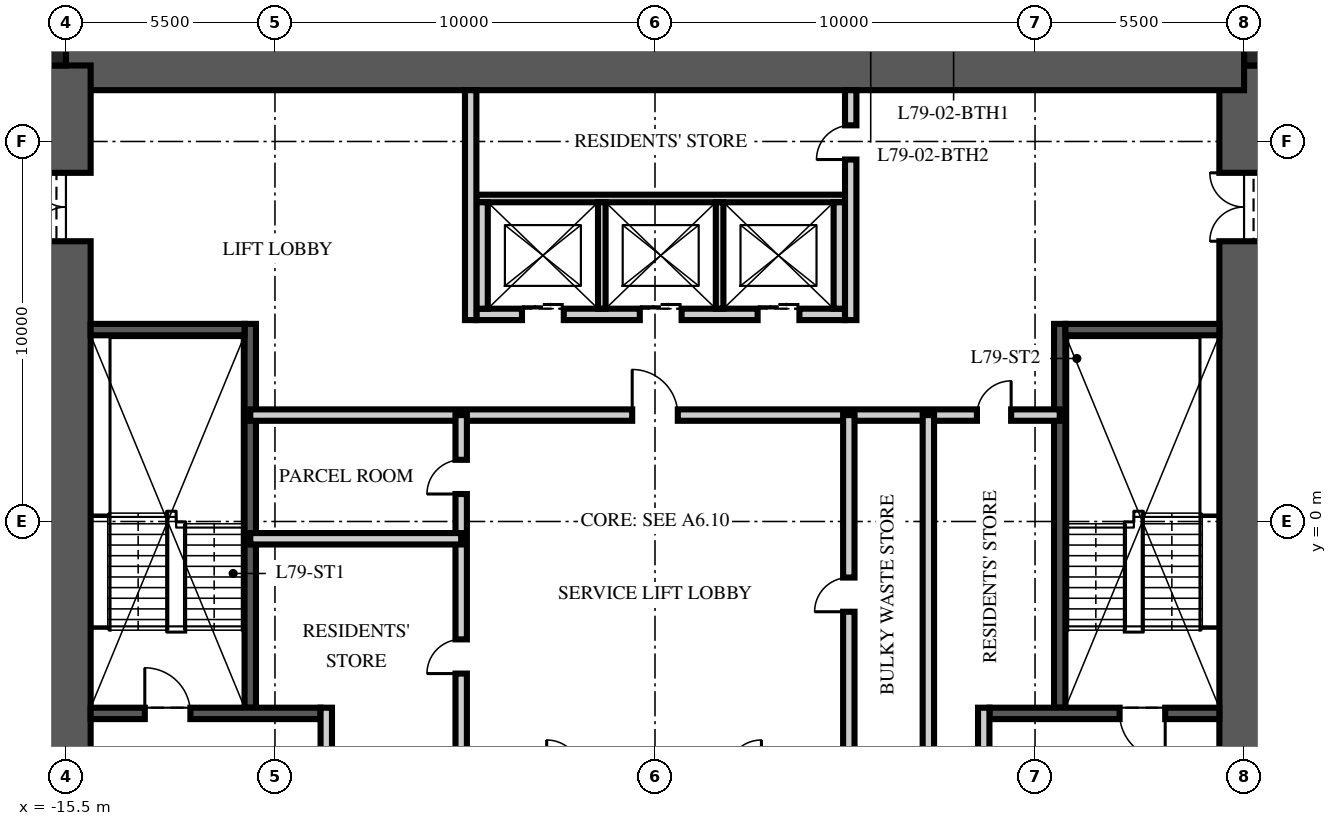
"""IFC4 building model, lengths in metres.
Left out: names, types, materials, properties, quantities, classifications, styles, units other than length and angle.
Written with IfcOpenShell. Run it as: python <this file> out.ifc"""

import sys

from ifc_helpers import new_model, si_unit, direction, frame, frame_2d, origin, origin_2d, place, context, subcontext, project, spatial, rectangle, extrude, element, fill, save


model = new_model("IFC4")
c1 = context("Model", 3, precision=1e-05, world=origin(), true_north=direction((0.0, 1.0)))
c2 = subcontext(c1, "Body", "Model", "MODEL_VIEW")
j1 = project(units=[si_unit("LENGTHUNIT", "METRE"), si_unit("PLANEANGLEUNIT", "RADIAN")], contexts=[c1])
p1 = place(None, origin())
s1 = spatial("IfcSite", under=j1, at=p1, CompositionType="ELEMENT")
p2 = place(p1, origin())
s2 = spatial("IfcBuilding", under=s1, at=p2, CompositionType="ELEMENT")
p3 = place(p2, frame((0.0, 0.0, 315.75)))
s3 = spatial("IfcBuildingStorey", under=s2, at=p3, CompositionType="ELEMENT", Elevation=315.75)
p4 = place(p3, frame((15.5, -12.0, -0.25), z_axis=(0.0, 0.0, 1.0), x_axis=(0.0, 1.0, 0.0)))
e1 = element("IfcWall", 1, at=p4, inside=s3, PredefinedType="SHEAR", context=c2, shape_type="SweptSolid", body=[
    extrude(rectangle(XDim=24.0, YDim=1.3, at=frame_2d((12.0, 0.0))), origin(), (0.0, 0.0, 1.0), 3.75),
])
p5 = place(p4, frame((3.125, 0.0, 0.25)))
e2 = element("IfcOpeningElement", 2, at=p5, cuts=e1, PredefinedType="OPENING", context=c2, shape_type="SweptSolid", body=[
    extrude(rectangle(XDim=1.2, YDim=2.1, at=frame_2d((0.6, 1.05))), frame((0.0, 0.66, 0.0), z_axis=(0.0, -1.0, 0.0), x_axis=(1.0, 0.0, 0.0)), (0.0, 0.0, 1.0), 1.32),
])
p6 = place(p4, frame((19.375, 0.0, 0.25)))
e3 = element("IfcOpeningElement", 3, at=p6, cuts=e1, PredefinedType="OPENING", context=c2, shape_type="SweptSolid", body=[
    extrude(rectangle(XDim=1.8, YDim=2.1, at=frame_2d((0.9, 1.05))), frame((0.0, 0.66, 0.0), z_axis=(0.0, -1.0, 0.0), x_axis=(1.0, 0.0, 0.0)), (0.0, 0.0, 1.0), 1.32),
])
p7 = place(p3, frame((-15.5, 12.0, -0.25), z_axis=(0.0, 0.0, 1.0), x_axis=(1.0, 0.0, 0.0)))
e4 = element("IfcWall", 4, at=p7, inside=s3, PredefinedType="SHEAR", context=c2, shape_type="SweptSolid", body=[
    extrude(rectangle(XDim=31.0, YDim=1.3, at=frame_2d((15.5, 0.0))), origin(), (0.0, 0.0, 1.0), 3.75),
])
p8 = place(p3, frame((-15.5, -12.0, -0.25), z_axis=(0.0, 0.0, 1.0), x_axis=(0.0, 1.0, 0.0)))
e5 = element("IfcWall", 5, at=p8, inside=s3, PredefinedType="SHEAR", context=c2, shape_type="SweptSolid", body=[
    extrude(rectangle(XDim=24.0, YDim=1.3, at=frame_2d((12.0, 0.0))), origin(), (0.0, 0.0, 1.0), 3.75),
])
p9 = place(p8, frame((3.125, 0.0, 0.25)))
e6 = element("IfcOpeningElement", 6, at=p9, cuts=e5, PredefinedType="OPENING", context=c2, shape_type="SweptSolid", body=[
    extrude(rectangle(XDim=1.2, YDim=2.1, at=frame_2d((0.6, 1.05))), frame((0.0, 0.66, 0.0), z_axis=(0.0, -1.0, 0.0), x_axis=(1.0, 0.0, 0.0)), (0.0, 0.0, 1.0), 1.32),
])
p10 = place(p8, frame((19.375, 0.0, 0.25)))
e7 = element("IfcOpeningElement", 7, at=p10, cuts=e5, PredefinedType="OPENING", context=c2, shape_type="SweptSolid", body=[
    extrude(rectangle(XDim=1.8, YDim=2.1, at=frame_2d((0.9, 1.05))), frame((0.0, 0.66, 0.0), z_axis=(0.0, -1.0, 0.0), x_axis=(1.0, 0.0, 0.0)), (0.0, 0.0, 1.0), 1.32),
])
for number, where, z_axis, x_axis in (
    (8, (15.825, 12.325, -0.25), (0.0, 0.0, 1.0), (1.0, 0.0, 0.0)),
    (9, (-15.825, 12.325, -0.25), (0.0, 0.0, 1.0), (1.0, 0.0, 0.0)),
):
    element("IfcColumn", number, at=place(p3, frame(where, z_axis=z_axis, x_axis=x_axis)), inside=s3, PredefinedType="COLUMN", context=c2, shape_type="SweptSolid", body=[
        extrude(rectangle(XDim=0.65, YDim=0.65, at=origin_2d()), origin(), (0.0, 0.0, 1.0), 3.75),
    ])
p11 = place(p3, frame((-10.65, -4.9, 0.0), z_axis=(0.0, 0.0, 1.0), x_axis=(0.0, 1.0, 0.0)))
e10 = element("IfcWall", 10, at=p11, inside=s3, PredefinedType="SOLIDWALL", context=c2, shape_type="SweptSolid", body=[
    extrude(rectangle(XDim=10.1, YDim=0.3, at=frame_2d((5.05, 0.0))), origin(), (0.0, 0.0, 1.0), 3.5),
])
p12 = place(p3, frame((-14.85, -5.05, 0.0), z_axis=(0.0, 0.0, 1.0), x_axis=(1.0, 0.0, 0.0)))
e11 = element("IfcWall", 11, at=p12, inside=s3, PredefinedType="SOLIDWALL", context=c2, shape_type="SweptSolid", body=[
    extrude(rectangle(XDim=6.05, YDim=0.3, at=frame_2d((3.025, 0.0))), origin(), (0.0, 0.0, 1.0), 3.5),
])
p13 = place(p12, frame((1.425, 0.0, 0.0)))
e12 = element("IfcOpeningElement", 12, at=p13, cuts=e11, PredefinedType="OPENING", context=c2, shape_type="SweptSolid", body=[
    extrude(rectangle(XDim=1.2, YDim=2.1, at=frame_2d((0.6, 1.05))), frame((0.0, 0.16, 0.0), z_axis=(0.0, -1.0, 0.0), x_axis=(1.0, 0.0, 0.0)), (0.0, 0.0, 1.0), 0.32),
])
p14 = place(p3, frame((-14.85, 5.05, 0.0), z_axis=(0.0, 0.0, 1.0), x_axis=(1.0, 0.0, 0.0)))
e13 = element("IfcWall", 13, at=p14, inside=s3, PredefinedType="SOLIDWALL", context=c2, shape_type="SweptSolid", body=[
    extrude(rectangle(XDim=4.05, YDim=0.3, at=frame_2d((2.025, 0.0))), origin(), (0.0, 0.0, 1.0), 3.5),
])
p15 = place(p3, frame((-8.65, -11.35, 0.0), z_axis=(0.0, 0.0, 1.0), x_axis=(0.0, 1.0, 0.0)))
e14 = element("IfcWall", 14, at=p15, inside=s3, PredefinedType="PARTITIONING", context=c2, shape_type="SweptSolid", body=[
    extrude(rectangle(XDim=6.45, YDim=0.3, at=frame_2d((3.225, 0.0))), origin(), (0.0, 0.0, 1.0), 3.5),
])
p16 = place(p15, frame((2.6, 0.0, 0.0)))
e15 = element("IfcOpeningElement", 15, at=p16, cuts=e14, PredefinedType="OPENING", context=c2, shape_type="SweptSolid", body=[
    extrude(rectangle(XDim=1.1, YDim=2.1, at=frame_2d((0.55, 1.05))), frame((0.0, 0.16, 0.0), z_axis=(0.0, -1.0, 0.0), x_axis=(1.0, 0.0, 0.0)), (0.0, 0.0, 1.0), 0.32),
])
p17 = place(p3, frame((10.65, -4.9, 0.0), z_axis=(0.0, 0.0, 1.0), x_axis=(0.0, 1.0, 0.0)))
e16 = element("IfcWall", 16, at=p17, inside=s3, PredefinedType="SOLIDWALL", context=c2, shape_type="SweptSolid", body=[
    extrude(rectangle(XDim=10.1, YDim=0.3, at=frame_2d((5.05, 0.0))), origin(), (0.0, 0.0, 1.0), 3.5),
])
p18 = place(p3, frame((14.85, -5.05, 0.0), z_axis=(0.0, 0.0, 1.0), x_axis=(-1.0, 0.0, 0.0)))
e17 = element("IfcWall", 17, at=p18, inside=s3, PredefinedType="SOLIDWALL", context=c2, shape_type="SweptSolid", body=[
    extrude(rectangle(XDim=6.05, YDim=0.3, at=frame_2d((3.025, 0.0))), origin(), (0.0, 0.0, 1.0), 3.5),
])
p19 = place(p18, frame((1.425, 0.0, 0.0)))
e18 = element("IfcOpeningElement", 18, at=p19, cuts=e17, PredefinedType="OPENING", context=c2, shape_type="SweptSolid", body=[
    extrude(rectangle(XDim=1.2, YDim=2.1, at=frame_2d((0.6, 1.05))), frame((0.0, 0.16, 0.0), z_axis=(0.0, -1.0, 0.0), x_axis=(1.0, 0.0, 0.0)), (0.0, 0.0, 1.0), 0.32),
])
p20 = place(p3, frame((14.85, 5.05, 0.0), z_axis=(0.0, 0.0, 1.0), x_axis=(-1.0, 0.0, 0.0)))
e19 = element("IfcWall", 19, at=p20, inside=s3, PredefinedType="SOLIDWALL", context=c2, shape_type="SweptSolid", body=[
    extrude(rectangle(XDim=4.05, YDim=0.3, at=frame_2d((2.025, 0.0))), origin(), (0.0, 0.0, 1.0), 3.5),
])
p21 = place(p3, frame((8.65, -11.35, 0.0), z_axis=(0.0, 0.0, 1.0), x_axis=(0.0, 1.0, 0.0)))
e20 = element("IfcWall", 20, at=p21, inside=s3, PredefinedType="PARTITIONING", context=c2, shape_type="SweptSolid", body=[
    extrude(rectangle(XDim=6.45, YDim=0.3, at=frame_2d((3.225, 0.0))), origin(), (0.0, 0.0, 1.0), 3.5),
])
p22 = place(p21, frame((2.6, 0.0, 0.0)))
e21 = element("IfcOpeningElement", 21, at=p22, cuts=e20, PredefinedType="OPENING", context=c2, shape_type="SweptSolid", body=[
    extrude(rectangle(XDim=1.1, YDim=2.1, at=frame_2d((0.55, 1.05))), frame((0.0, 0.16, 0.0), z_axis=(0.0, -1.0, 0.0), x_axis=(1.0, 0.0, 0.0)), (0.0, 0.0, 1.0), 0.32),
])
p23 = place(p3, frame((-4.7, 5.45, 0.0), z_axis=(0.0, 0.0, 1.0), x_axis=(1.0, 0.0, 0.0)))
e22 = element("IfcWall", 22, at=p23, inside=s3, PredefinedType="PARTITIONING", context=c2, shape_type="SweptSolid", body=[
    extrude(rectangle(XDim=9.7, YDim=0.3, at=frame_2d((4.85, 0.0))), origin(), (0.0, 0.0, 1.0), 3.5),
])
p24 = place(p23, frame((1.2, 0.0, 0.0)))
e23 = element("IfcOpeningElement", 23, at=p24, cuts=e22, PredefinedType="OPENING", context=c2, shape_type="SweptSolid", body=[
    extrude(rectangle(XDim=1.1, YDim=2.1, at=frame_2d((0.55, 1.05))), frame((0.0, 0.16, 0.0), z_axis=(0.0, -1.0, 0.0), x_axis=(1.0, 0.0, 0.0)), (0.0, 0.0, 1.0), 0.32),
])
p25 = place(p23, frame((4.3, 0.0, 0.0)))
e24 = element("IfcOpeningElement", 24, at=p25, cuts=e22, PredefinedType="OPENING", context=c2, shape_type="SweptSolid", body=[
    extrude(rectangle(XDim=1.1, YDim=2.1, at=frame_2d((0.55, 1.05))), frame((0.0, 0.16, 0.0), z_axis=(0.0, -1.0, 0.0), x_axis=(1.0, 0.0, 0.0)), (0.0, 0.0, 1.0), 0.32),
])
p26 = place(p23, frame((7.4, 0.0, 0.0)))
e25 = element("IfcOpeningElement", 25, at=p26, cuts=e22, PredefinedType="OPENING", context=c2, shape_type="SweptSolid", body=[
    extrude(rectangle(XDim=1.1, YDim=2.1, at=frame_2d((0.55, 1.05))), frame((0.0, 0.16, 0.0), z_axis=(0.0, -1.0, 0.0), x_axis=(1.0, 0.0, 0.0)), (0.0, 0.0, 1.0), 0.32),
])
p27 = place(p3, frame((-4.7, 8.5, 0.0), z_axis=(0.0, 0.0, 1.0), x_axis=(1.0, 0.0, 0.0)))
e26 = element("IfcWall", 26, at=p27, inside=s3, PredefinedType="PARTITIONING", context=c2, shape_type="SweptSolid", body=[
    extrude(rectangle(XDim=9.7, YDim=0.2, at=frame_2d((4.85, 0.0))), origin(), (0.0, 0.0, 1.0), 3.5),
])
for number, where, z_axis, x_axis in (
    (27, (-4.55, 5.6, 0.0), (0.0, 0.0, 1.0), (0.0, 1.0, 0.0)),
    (28, (4.85, 5.6, 0.0), (0.0, 0.0, 1.0), (0.0, 1.0, 0.0)),
):
    element("IfcWall", number, at=place(p3, frame(where, z_axis=z_axis, x_axis=x_axis)), inside=s3, PredefinedType="PARTITIONING", context=c2, shape_type="SweptSolid", body=[
        extrude(rectangle(XDim=2.8, YDim=0.3, at=frame_2d((1.4, 0.0))), origin(), (0.0, 0.0, 1.0), 3.5),
    ])
for number, where, z_axis, x_axis in (
    (29, (-1.4, 5.6, 0.0), (0.0, 0.0, 1.0), (0.0, 1.0, 0.0)),
    (30, (1.7, 5.6, 0.0), (0.0, 0.0, 1.0), (0.0, 1.0, 0.0)),
):
    element("IfcWall", number, at=place(p3, frame(where, z_axis=z_axis, x_axis=x_axis)), inside=s3, PredefinedType="PARTITIONING", context=c2, shape_type="SweptSolid", body=[
        extrude(rectangle(XDim=2.8, YDim=0.2, at=frame_2d((1.4, 0.0))), origin(), (0.0, 0.0, 1.0), 3.5),
    ])
p28 = place(p3, frame((-10.65, 2.8, 0.0), z_axis=(0.0, 0.0, 1.0), x_axis=(1.0, 0.0, 0.0)))
e31 = element("IfcWall", 31, at=p28, inside=s3, PredefinedType="PARTITIONING", context=c2, shape_type="SweptSolid", body=[
    extrude(rectangle(XDim=21.3, YDim=0.3, at=frame_2d((10.65, 0.0))), origin(), (0.0, 0.0, 1.0), 3.5),
])
p29 = place(p28, frame((10.05, 0.0, 0.0)))
e32 = element("IfcOpeningElement", 32, at=p29, cuts=e31, PredefinedType="OPENING", context=c2, shape_type="SweptSolid", body=[
    extrude(rectangle(XDim=1.2, YDim=2.1, at=frame_2d((0.6, 1.05))), frame((0.0, 0.16, 0.0), z_axis=(0.0, -1.0, 0.0), x_axis=(1.0, 0.0, 0.0)), (0.0, 0.0, 1.0), 0.32),
])
p30 = place(p28, frame((19.121, 0.0, 0.0)))
e33 = element("IfcOpeningElement", 33, at=p30, cuts=e31, PredefinedType="OPENING", context=c2, shape_type="SweptSolid", body=[
    extrude(rectangle(XDim=0.9, YDim=2.1, at=frame_2d((0.45, 1.05))), frame((0.0, 0.16, 0.0), z_axis=(0.0, -1.0, 0.0), x_axis=(1.0, 0.0, 0.0)), (0.0, 0.0, 1.0), 0.32),
])
p31 = place(p3, frame((-5.1, -6.65, 0.0), z_axis=(0.0, 0.0, 1.0), x_axis=(0.0, 1.0, 0.0)))
e34 = element("IfcWall", 34, at=p31, inside=s3, PredefinedType="PARTITIONING", context=c2, shape_type="SweptSolid", body=[
    extrude(rectangle(XDim=9.45, YDim=0.3, at=frame_2d((4.725, 0.0))), origin(), (0.0, 0.0, 1.0), 3.5),
])
p32 = place(p31, frame((2.648, 0.0, 0.0)))
e35 = element("IfcOpeningElement", 35, at=p32, cuts=e34, PredefinedType="OPENING", context=c2, shape_type="SweptSolid", body=[
    extrude(rectangle(XDim=0.9, YDim=2.1, at=frame_2d((0.45, 1.05))), frame((0.0, 0.16, 0.0), z_axis=(0.0, -1.0, 0.0), x_axis=(1.0, 0.0, 0.0)), (0.0, 0.0, 1.0), 0.32),
])
p33 = place(p31, frame((7.373, 0.0, 0.0)))
e36 = element("IfcOpeningElement", 36, at=p33, cuts=e34, PredefinedType="OPENING", context=c2, shape_type="SweptSolid", body=[
    extrude(rectangle(XDim=0.9, YDim=2.1, at=frame_2d((0.45, 1.05))), frame((0.0, 0.16, 0.0), z_axis=(0.0, -1.0, 0.0), x_axis=(1.0, 0.0, 0.0)), (0.0, 0.0, 1.0), 0.32),
])
p34 = place(p3, frame((5.1, -6.65, 0.0), z_axis=(0.0, 0.0, 1.0), x_axis=(0.0, 1.0, 0.0)))
e37 = element("IfcWall", 37, at=p34, inside=s3, PredefinedType="PARTITIONING", context=c2, shape_type="SweptSolid", body=[
    extrude(rectangle(XDim=9.45, YDim=0.3, at=frame_2d((4.725, 0.0))), origin(), (0.0, 0.0, 1.0), 3.5),
])
p35 = place(p34, frame((4.275, 0.0, 0.0)))
e38 = element("IfcOpeningElement", 38, at=p35, cuts=e37, PredefinedType="OPENING", context=c2, shape_type="SweptSolid", body=[
    extrude(rectangle(XDim=0.9, YDim=2.1, at=frame_2d((0.45, 1.05))), frame((0.0, 0.16, 0.0), z_axis=(0.0, -1.0, 0.0), x_axis=(1.0, 0.0, 0.0)), (0.0, 0.0, 1.0), 0.32),
])
p36 = place(p3, frame((-10.65, -0.455, 0.0), z_axis=(0.0, 0.0, 1.0), x_axis=(1.0, 0.0, 0.0)))
e39 = element("IfcWall", 39, at=p36, inside=s3, PredefinedType="PARTITIONING", context=c2, shape_type="SweptSolid", body=[
    extrude(rectangle(XDim=5.55, YDim=0.3, at=frame_2d((2.775, 0.0))), origin(), (0.0, 0.0, 1.0), 3.5),
])
p37 = place(p3, frame((7.193, -6.65, 0.0), z_axis=(0.0, 0.0, 1.0), x_axis=(0.0, 1.0, 0.0)))
e40 = element("IfcWall", 40, at=p37, inside=s3, PredefinedType="PARTITIONING", context=c2, shape_type="SweptSolid", body=[
    extrude(rectangle(XDim=9.45, YDim=0.3, at=frame_2d((4.725, 0.0))), origin(), (0.0, 0.0, 1.0), 3.5),
])
p38 = place(p3, frame((-4.85, 5.3, 0.0), z_axis=(0.0, 0.0, 1.0), x_axis=(0.0, 1.0, 0.0)))
e41 = element("IfcWall", 41, at=p38, inside=s3, PredefinedType="PARTITIONING", context=c2, shape_type="SweptSolid", body=[
    extrude(rectangle(XDim=6.05, YDim=0.3, at=frame_2d((3.025, 0.0))), origin(), (0.0, 0.0, 1.0), 3.5),
])
p39 = place(p3, frame((5.15, 5.3, 0.0), z_axis=(0.0, 0.0, 1.0), x_axis=(0.0, 1.0, 0.0)))
e42 = element("IfcWall", 42, at=p39, inside=s3, PredefinedType="PARTITIONING", context=c2, shape_type="SweptSolid", body=[
    extrude(rectangle(XDim=6.05, YDim=0.3, at=frame_2d((3.025, 0.0))), origin(), (0.0, 0.0, 1.0), 3.5),
])
p40 = place(p39, frame((4.225, 0.0, 0.0)))
e43 = element("IfcOpeningElement", 43, at=p40, cuts=e42, PredefinedType="OPENING", context=c2, shape_type="SweptSolid", body=[
    extrude(rectangle(XDim=0.9, YDim=2.1, at=frame_2d((0.45, 1.05))), frame((0.0, 0.16, 0.0), z_axis=(0.0, -1.0, 0.0), x_axis=(1.0, 0.0, 0.0)), (0.0, 0.0, 1.0), 0.32),
])
p41 = place(p13, origin())
e44 = element("IfcDoor", 44, at=p41, inside=s3, OperationType="SINGLE_SWING_LEFT", PredefinedType="DOOR", context=c2, shape_type="SweptSolid", body=[
    extrude(rectangle(XDim=1.2, YDim=2.1, at=frame_2d((0.6, 1.05))), frame((0.0, 0.025, 0.0), z_axis=(0.0, -1.0, 0.0), x_axis=(1.0, 0.0, 0.0)), (0.0, 0.0, 1.0), 0.05),
])
fill(e12, e44)
p42 = place(p10, origin())
e45 = element("IfcDoor", 45, at=p42, inside=s3, OperationType="DOUBLE_DOOR_SINGLE_SWING", PredefinedType="DOOR", context=c2, shape_type="SweptSolid", body=[
    extrude(rectangle(XDim=1.8, YDim=2.1, at=frame_2d((0.9, 1.05))), frame((0.0, 0.025, 0.0), z_axis=(0.0, -1.0, 0.0), x_axis=(1.0, 0.0, 0.0)), (0.0, 0.0, 1.0), 0.05),
])
fill(e7, e45)
p43 = place(p19, origin())
e46 = element("IfcDoor", 46, at=p43, inside=s3, OperationType="SINGLE_SWING_LEFT", PredefinedType="DOOR", context=c2, shape_type="SweptSolid", body=[
    extrude(rectangle(XDim=1.2, YDim=2.1, at=frame_2d((0.6, 1.05))), frame((0.0, 0.025, 0.0), z_axis=(0.0, -1.0, 0.0), x_axis=(1.0, 0.0, 0.0)), (0.0, 0.0, 1.0), 0.05),
])
fill(e18, e46)
p44 = place(p6, origin())
e47 = element("IfcDoor", 47, at=p44, inside=s3, OperationType="DOUBLE_DOOR_SINGLE_SWING", PredefinedType="DOOR", context=c2, shape_type="SweptSolid", body=[
    extrude(rectangle(XDim=1.8, YDim=2.1, at=frame_2d((0.9, 1.05))), frame((0.0, 0.025, 0.0), z_axis=(0.0, -1.0, 0.0), x_axis=(1.0, 0.0, 0.0)), (0.0, 0.0, 1.0), 0.05),
])
fill(e3, e47)
p45 = place(p24, origin())
e48 = element("IfcDoor", 48, at=p45, inside=s3, OperationType="DOUBLE_DOOR_SLIDING", PredefinedType="DOOR", context=c2, shape_type="SweptSolid", body=[
    extrude(rectangle(XDim=1.1, YDim=2.1, at=frame_2d((0.55, 1.05))), frame((0.0, 0.025, 0.0), z_axis=(0.0, -1.0, 0.0), x_axis=(1.0, 0.0, 0.0)), (0.0, 0.0, 1.0), 0.05),
])
fill(e23, e48)
p46 = place(p25, origin())
e49 = element("IfcDoor", 49, at=p46, inside=s3, OperationType="DOUBLE_DOOR_SLIDING", PredefinedType="DOOR", context=c2, shape_type="SweptSolid", body=[
    extrude(rectangle(XDim=1.1, YDim=2.1, at=frame_2d((0.55, 1.05))), frame((0.0, 0.025, 0.0), z_axis=(0.0, -1.0, 0.0), x_axis=(1.0, 0.0, 0.0)), (0.0, 0.0, 1.0), 0.05),
])
fill(e24, e49)
p47 = place(p26, origin())
e50 = element("IfcDoor", 50, at=p47, inside=s3, OperationType="DOUBLE_DOOR_SLIDING", PredefinedType="DOOR", context=c2, shape_type="SweptSolid", body=[
    extrude(rectangle(XDim=1.1, YDim=2.1, at=frame_2d((0.55, 1.05))), frame((0.0, 0.025, 0.0), z_axis=(0.0, -1.0, 0.0), x_axis=(1.0, 0.0, 0.0)), (0.0, 0.0, 1.0), 0.05),
])
fill(e25, e50)
p48 = place(p29, origin())
e51 = element("IfcDoor", 51, at=p48, inside=s3, OperationType="SINGLE_SWING_LEFT", PredefinedType="DOOR", context=c2, shape_type="SweptSolid", body=[
    extrude(rectangle(XDim=1.2, YDim=2.1, at=frame_2d((0.6, 1.05))), frame((0.0, 0.025, 0.0), z_axis=(0.0, -1.0, 0.0), x_axis=(1.0, 0.0, 0.0)), (0.0, 0.0, 1.0), 0.05),
])
fill(e32, e51)
p49 = place(p32, origin())
e52 = element("IfcDoor", 52, at=p49, inside=s3, OperationType="SINGLE_SWING_LEFT", PredefinedType="DOOR", context=c2, shape_type="SweptSolid", body=[
    extrude(rectangle(XDim=0.9, YDim=2.1, at=frame_2d((0.45, 1.05))), frame((0.0, 0.025, 0.0), z_axis=(0.0, -1.0, 0.0), x_axis=(1.0, 0.0, 0.0)), (0.0, 0.0, 1.0), 0.05),
])
fill(e35, e52)
p50 = place(p33, origin())
e53 = element("IfcDoor", 53, at=p50, inside=s3, OperationType="SINGLE_SWING_LEFT", PredefinedType="DOOR", context=c2, shape_type="SweptSolid", body=[
    extrude(rectangle(XDim=0.9, YDim=2.1, at=frame_2d((0.45, 1.05))), frame((0.0, 0.025, 0.0), z_axis=(0.0, -1.0, 0.0), x_axis=(1.0, 0.0, 0.0)), (0.0, 0.0, 1.0), 0.05),
])
fill(e36, e53)
p51 = place(p35, origin())
e54 = element("IfcDoor", 54, at=p51, inside=s3, OperationType="SINGLE_SWING_LEFT", PredefinedType="DOOR", context=c2, shape_type="SweptSolid", body=[
    extrude(rectangle(XDim=0.9, YDim=2.1, at=frame_2d((0.45, 1.05))), frame((0.0, 0.025, 0.0), z_axis=(0.0, -1.0, 0.0), x_axis=(1.0, 0.0, 0.0)), (0.0, 0.0, 1.0), 0.05),
])
fill(e38, e54)
p52 = place(p30, origin())
e55 = element("IfcDoor", 55, at=p52, inside=s3, OperationType="SINGLE_SWING_RIGHT", PredefinedType="DOOR", context=c2, shape_type="SweptSolid", body=[
    extrude(rectangle(XDim=0.9, YDim=2.1, at=frame_2d((0.45, 1.05))), frame((0.0, 0.025, 0.0), z_axis=(0.0, -1.0, 0.0), x_axis=(1.0, 0.0, 0.0)), (0.0, 0.0, 1.0), 0.05),
])
fill(e33, e55)
p53 = place(p40, origin())
e56 = element("IfcDoor", 56, at=p53, inside=s3, OperationType="SINGLE_SWING_LEFT", PredefinedType="DOOR", context=c2, shape_type="SweptSolid", body=[
    extrude(rectangle(XDim=0.9, YDim=2.1, at=frame_2d((0.45, 1.05))), frame((0.0, 0.025, 0.0), z_axis=(0.0, -1.0, 0.0), x_axis=(1.0, 0.0, 0.0)), (0.0, 0.0, 1.0), 0.05),
])
fill(e43, e56)
save(model, sys.argv[1])
